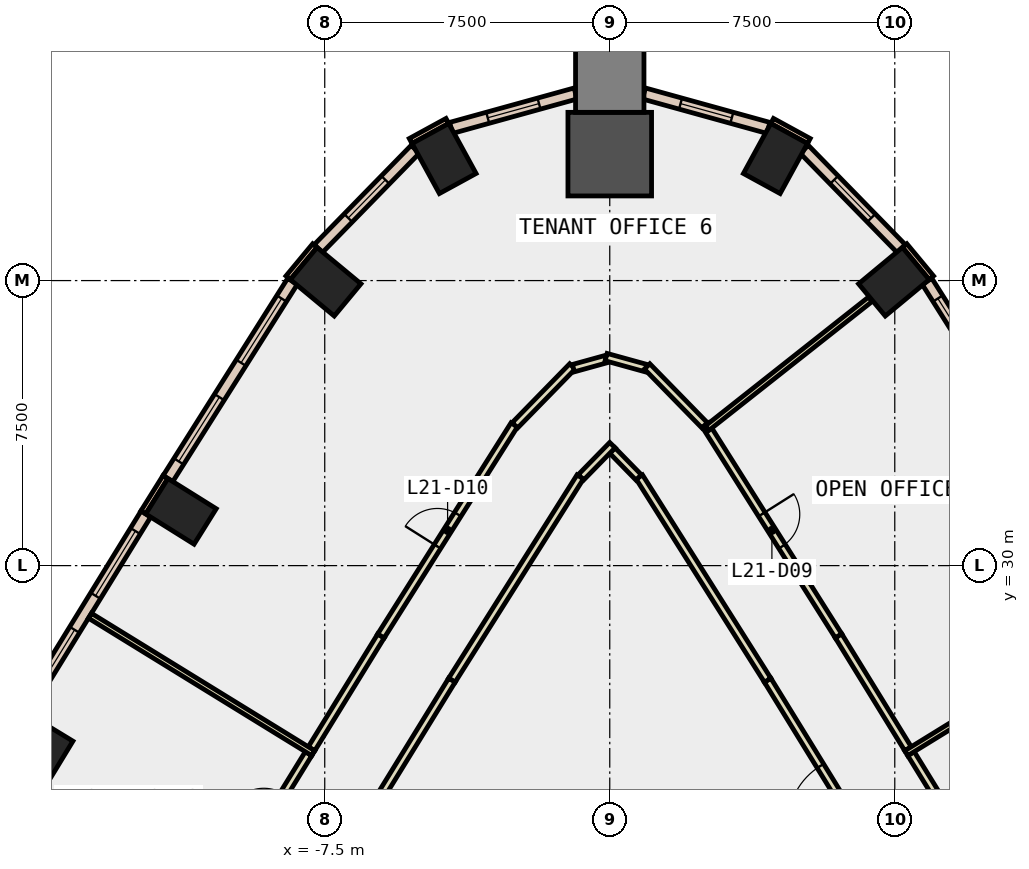
"""IFC4 building model, lengths in metres.
Left out: names, types, materials, properties, quantities, classifications, styles, units other than length and angle.
Written with IfcOpenShell. Run it as: python <this file> out.ifc"""

import sys

from ifc_helpers import new_model, si_unit, direction, frame, frame_2d, origin, origin_2d, place, context, subcontext, project, spatial, rectangle, extrude, element, fill, save


model = new_model("IFC4")
c1 = context("Model", 3, precision=1e-05, world=origin(), true_north=direction((0.0, 1.0)))
c2 = subcontext(c1, "Body", "Model", "MODEL_VIEW")
j1 = project(units=[si_unit("LENGTHUNIT", "METRE"), si_unit("PLANEANGLEUNIT", "RADIAN")], contexts=[c1])
p1 = place(None, origin())
s1 = spatial("IfcSite", under=j1, at=p1, CompositionType="ELEMENT")
p2 = place(p1, origin())
s2 = spatial("IfcBuilding", under=s1, at=p2, CompositionType="ELEMENT")
p3 = place(p2, frame((0.0, 0.0, 99.2)))
s3 = spatial("IfcBuildingStorey", under=s2, at=p3, CompositionType="ELEMENT", Elevation=99.2)
for number, where, z_axis, x_axis in (
    (1, (7.476, 37.47, -0.4), (0.0, 0.0, 1.0), (-0.638, 0.77, 0.0)),
    (2, (4.36, 40.712, -0.4), (0.0, 0.0, 1.0), (-0.877, 0.48, 0.0)),
):
    element("IfcColumn", number, at=place(p3, frame(where, z_axis=z_axis, x_axis=x_axis)), inside=s3, PredefinedType="COLUMN", context=c2, shape_type="SweptSolid", body=[
        extrude(rectangle(XDim=1.1, YDim=1.5, at=origin_2d()), origin(), (0.0, 0.0, 1.0), 4.2),
    ])
p4 = place(p3, frame((0.0, 40.827, -0.4), z_axis=(0.0, 0.0, 1.0), x_axis=(0.0, 1.0, 0.0)))
e3 = element("IfcColumn", 3, at=p4, inside=s3, PredefinedType="COLUMN", context=c2, shape_type="SweptSolid", body=[
    extrude(rectangle(XDim=2.2, YDim=2.2, at=origin_2d()), origin(), (0.0, 0.0, 1.0), 4.2),
])
for number, where, z_axis, x_axis in (
    (4, (-4.36, 40.712, -0.4), (0.0, 0.0, 1.0), (0.877, 0.48, 0.0)),
    (5, (-7.476, 37.47, -0.4), (0.0, 0.0, 1.0), (0.638, 0.77, 0.0)),
    (6, (-11.283, 31.428, -0.4), (0.0, 0.0, 1.0), (0.53, 0.848, 0.0)),
    (7, (-15.053, 25.302, -0.4), (0.0, 0.0, 1.0), (0.52, 0.854, 0.0)),
):
    element("IfcColumn", number, at=place(p3, frame(where, z_axis=z_axis, x_axis=x_axis)), inside=s3, PredefinedType="COLUMN", context=c2, shape_type="SweptSolid", body=[
        extrude(rectangle(XDim=1.1, YDim=1.5, at=origin_2d()), origin(), (0.0, 0.0, 1.0), 4.2),
    ])
p5 = place(p3, frame((0.0, 42.827, -0.4), z_axis=(0.0, 0.0, 1.0), x_axis=(0.0, 1.0, 0.0)))
e8 = element("IfcColumn", 8, at=p5, inside=s3, PredefinedType="COLUMN", context=c2, shape_type="SweptSolid", body=[
    extrude(rectangle(XDim=1.8, YDim=1.8, at=origin_2d()), origin(), (0.0, 0.0, 1.0), 4.2),
])
for number, where, z_axis, x_axis in (
    (9, (5.239, 41.172, 0.0), (0.0, 0.0, 1.0), (-0.878, 0.479, 0.0)),
    (10, (-4.273, 41.7, 0.0), (0.0, 0.0, 1.0), (-0.878, -0.479, 0.0)),
):
    element("IfcWall", number, at=place(p3, frame(where, z_axis=z_axis, x_axis=x_axis)), inside=s3, PredefinedType="STANDARD", context=c2, shape_type="SweptSolid", body=[
        extrude(rectangle(XDim=1.101, YDim=0.15, at=frame_2d((0.55, 0.0))), origin(), (0.0, 0.0, 1.0), 3.8),
    ])
for number, where, z_axis, x_axis in (
    (11, (8.462, 37.574, 0.0), (0.0, 0.0, 1.0), (-0.639, 0.77, 0.0)),
    (12, (-7.76, 38.42, 0.0), (0.0, 0.0, 1.0), (-0.639, -0.77, 0.0)),
):
    element("IfcWall", number, at=place(p3, frame(where, z_axis=z_axis, x_axis=x_axis)), inside=s3, PredefinedType="STANDARD", context=c2, shape_type="SweptSolid", body=[
        extrude(rectangle(XDim=1.099, YDim=0.15, at=frame_2d((0.55, 0.0))), origin(), (0.0, 0.0, 1.0), 3.8),
    ])
p6 = place(p3, frame((-11.691, 32.332, 0.0), z_axis=(0.0, 0.0, 1.0), x_axis=(-0.529879262372, -0.848073090782, 0.0)))
e13 = element("IfcWall", 13, at=p6, inside=s3, PredefinedType="STANDARD", context=c2, shape_type="SweptSolid", body=[
    extrude(rectangle(XDim=1.1, YDim=0.15, at=frame_2d((0.55, 0.0))), origin(), (0.0, 0.0, 1.0), 3.8),
])
p7 = place(p3, frame((11.626, 32.29, 0.0), z_axis=(0.0, 0.0, 1.0), x_axis=(-0.534018429465, 0.845472836342, 0.0)))
e14 = element("IfcWall", 14, at=p7, inside=s3, PredefinedType="STANDARD", context=c2, shape_type="SweptSolid", body=[
    extrude(rectangle(XDim=6.138, YDim=0.3, at=frame_2d((3.069, 0.0))), origin(), (0.0, 0.0, 1.0), 3.8),
])
p8 = place(p7, frame((0.535, 0.0, 0.9)))
e15 = element("IfcOpeningElement", 15, at=p8, cuts=e14, PredefinedType="OPENING", context=c2, shape_type="SweptSolid", body=[
    extrude(rectangle(XDim=2.0, YDim=2.6, at=frame_2d((1.0, 1.3))), frame((0.0, 0.16, 0.0), z_axis=(0.0, -1.0, 0.0), x_axis=(1.0, 0.0, 0.0)), (0.0, 0.0, 1.0), 0.32),
])
p9 = place(p7, frame((3.604, 0.0, 0.9)))
e16 = element("IfcOpeningElement", 16, at=p9, cuts=e14, PredefinedType="OPENING", context=c2, shape_type="SweptSolid", body=[
    extrude(rectangle(XDim=2.0, YDim=2.6, at=frame_2d((1.0, 1.3))), frame((0.0, 0.16, 0.0), z_axis=(0.0, -1.0, 0.0), x_axis=(1.0, 0.0, 0.0)), (0.0, 0.0, 1.0), 0.32),
])
p10 = place(p3, frame((7.668, 38.343, 0.0), z_axis=(0.0, 0.0, 1.0), x_axis=(-0.698695735804, 0.715418946331, 0.0)))
e17 = element("IfcWall", 17, at=p10, inside=s3, PredefinedType="STANDARD", context=c2, shape_type="SweptSolid", body=[
    extrude(rectangle(XDim=3.65, YDim=0.3, at=frame_2d((1.825, 0.0))), origin(), (0.0, 0.0, 1.0), 3.8),
])
p11 = place(p10, frame((1.125, 0.0, 0.9)))
e18 = element("IfcOpeningElement", 18, at=p11, cuts=e17, PredefinedType="OPENING", context=c2, shape_type="SweptSolid", body=[
    extrude(rectangle(XDim=1.4, YDim=2.6, at=frame_2d((0.7, 1.3))), frame((0.0, 0.16, 0.0), z_axis=(0.0, -1.0, 0.0), x_axis=(1.0, 0.0, 0.0)), (0.0, 0.0, 1.0), 0.32),
])
p12 = place(p3, frame((4.175, 41.517, 0.0), z_axis=(0.0, 0.0, 1.0), x_axis=(-0.963822898894, 0.266543466562, 0.0)))
e19 = element("IfcWall", 19, at=p12, inside=s3, PredefinedType="STANDARD", context=c2, shape_type="SweptSolid", body=[
    extrude(rectangle(XDim=3.399, YDim=0.3, at=frame_2d((1.7, 0.0))), origin(), (0.0, 0.0, 1.0), 3.8),
])
p13 = place(p12, frame((0.999, 0.0, 0.9)))
e20 = element("IfcOpeningElement", 20, at=p13, cuts=e19, PredefinedType="OPENING", context=c2, shape_type="SweptSolid", body=[
    extrude(rectangle(XDim=1.4, YDim=2.6, at=frame_2d((0.7, 1.3))), frame((0.0, 0.16, 0.0), z_axis=(0.0, -1.0, 0.0), x_axis=(1.0, 0.0, 0.0)), (0.0, 0.0, 1.0), 0.32),
])
p14 = place(p3, frame((-0.899, 42.423, 0.0), z_axis=(0.0, 0.0, 1.0), x_axis=(-0.963822898894, -0.266543466562, 0.0)))
e21 = element("IfcWall", 21, at=p14, inside=s3, PredefinedType="STANDARD", context=c2, shape_type="SweptSolid", body=[
    extrude(rectangle(XDim=3.399, YDim=0.3, at=frame_2d((1.7, 0.0))), origin(), (0.0, 0.0, 1.0), 3.8),
])
p15 = place(p14, frame((0.999, 0.0, 0.9)))
e22 = element("IfcOpeningElement", 22, at=p15, cuts=e21, PredefinedType="OPENING", context=c2, shape_type="SweptSolid", body=[
    extrude(rectangle(XDim=1.4, YDim=2.6, at=frame_2d((0.7, 1.3))), frame((0.0, 0.16, 0.0), z_axis=(0.0, -1.0, 0.0), x_axis=(1.0, 0.0, 0.0)), (0.0, 0.0, 1.0), 0.32),
])
p16 = place(p3, frame((-5.118, 40.954, 0.0), z_axis=(0.0, 0.0, 1.0), x_axis=(-0.698695735804, -0.715418946331, 0.0)))
e23 = element("IfcWall", 23, at=p16, inside=s3, PredefinedType="STANDARD", context=c2, shape_type="SweptSolid", body=[
    extrude(rectangle(XDim=3.65, YDim=0.3, at=frame_2d((1.825, 0.0))), origin(), (0.0, 0.0, 1.0), 3.8),
])
p17 = place(p16, frame((1.125, 0.0, 0.9)))
e24 = element("IfcOpeningElement", 24, at=p17, cuts=e23, PredefinedType="OPENING", context=c2, shape_type="SweptSolid", body=[
    extrude(rectangle(XDim=1.4, YDim=2.6, at=frame_2d((0.7, 1.3))), frame((0.0, 0.16, 0.0), z_axis=(0.0, -1.0, 0.0), x_axis=(1.0, 0.0, 0.0)), (0.0, 0.0, 1.0), 0.32),
])
p18 = place(p3, frame((-8.348, 37.48, 0.0), z_axis=(0.0, 0.0, 1.0), x_axis=(-0.534018429465, -0.845472836342, 0.0)))
e25 = element("IfcWall", 25, at=p18, inside=s3, PredefinedType="STANDARD", context=c2, shape_type="SweptSolid", body=[
    extrude(rectangle(XDim=6.138, YDim=0.3, at=frame_2d((3.069, 0.0))), origin(), (0.0, 0.0, 1.0), 3.8),
])
p19 = place(p18, frame((0.535, 0.0, 0.9)))
e26 = element("IfcOpeningElement", 26, at=p19, cuts=e25, PredefinedType="OPENING", context=c2, shape_type="SweptSolid", body=[
    extrude(rectangle(XDim=2.0, YDim=2.6, at=frame_2d((1.0, 1.3))), frame((0.0, 0.16, 0.0), z_axis=(0.0, -1.0, 0.0), x_axis=(1.0, 0.0, 0.0)), (0.0, 0.0, 1.0), 0.32),
])
p20 = place(p18, frame((3.604, 0.0, 0.9)))
e27 = element("IfcOpeningElement", 27, at=p20, cuts=e25, PredefinedType="OPENING", context=c2, shape_type="SweptSolid", body=[
    extrude(rectangle(XDim=2.0, YDim=2.6, at=frame_2d((1.0, 1.3))), frame((0.0, 0.16, 0.0), z_axis=(0.0, -1.0, 0.0), x_axis=(1.0, 0.0, 0.0)), (0.0, 0.0, 1.0), 0.32),
])
p21 = place(p3, frame((-12.207, 31.358, 0.0), z_axis=(0.0, 0.0, 1.0), x_axis=(-0.524121974895, -0.851643208998, 0.0)))
e28 = element("IfcWall", 28, at=p21, inside=s3, PredefinedType="STANDARD", context=c2, shape_type="SweptSolid", body=[
    extrude(rectangle(XDim=6.104, YDim=0.3, at=frame_2d((3.052, 0.0))), origin(), (0.0, 0.0, 1.0), 3.8),
])
p22 = place(p21, frame((0.526, 0.0, 0.9)))
e29 = element("IfcOpeningElement", 29, at=p22, cuts=e28, PredefinedType="OPENING", context=c2, shape_type="SweptSolid", body=[
    extrude(rectangle(XDim=2.0, YDim=2.6, at=frame_2d((1.0, 1.3))), frame((0.0, 0.16, 0.0), z_axis=(0.0, -1.0, 0.0), x_axis=(1.0, 0.0, 0.0)), (0.0, 0.0, 1.0), 0.32),
])
p23 = place(p21, frame((3.578, 0.0, 0.9)))
e30 = element("IfcOpeningElement", 30, at=p23, cuts=e28, PredefinedType="OPENING", context=c2, shape_type="SweptSolid", body=[
    extrude(rectangle(XDim=2.0, YDim=2.6, at=frame_2d((1.0, 1.3))), frame((0.0, 0.16, 0.0), z_axis=(0.0, -1.0, 0.0), x_axis=(1.0, 0.0, 0.0)), (0.0, 0.0, 1.0), 0.32),
])
p24 = place(p3, frame((7.875, 20.94, 0.0), z_axis=(0.0, 0.0, 1.0), x_axis=(-0.524183774504, 0.851605172921, 0.0)))
e31 = element("IfcWall", 31, at=p24, inside=s3, PredefinedType="PARTITIONING", context=c2, shape_type="SweptSolid", body=[
    extrude(rectangle(XDim=7.099, YDim=0.2, at=frame_2d((3.549, 0.0))), origin(), (0.0, 0.0, 1.0), 3.8),
])
p25 = place(p24, frame((2.649, 0.0, 0.0)))
e32 = element("IfcOpeningElement", 32, at=p25, cuts=e31, PredefinedType="OPENING", context=c2, shape_type="SweptSolid", body=[
    extrude(rectangle(XDim=1.8, YDim=2.1, at=frame_2d((0.9, 1.05))), frame((0.0, 0.11, 0.0), z_axis=(0.0, -1.0, 0.0), x_axis=(1.0, 0.0, 0.0)), (0.0, 0.0, 1.0), 0.22),
])
p26 = place(p3, frame((4.154, 26.985, 0.0), z_axis=(0.0, 0.0, 1.0), x_axis=(-0.53384777413, 0.84558060175, 0.0)))
e33 = element("IfcWall", 33, at=p26, inside=s3, PredefinedType="PARTITIONING", context=c2, shape_type="SweptSolid", body=[
    extrude(rectangle(XDim=6.326, YDim=0.2, at=frame_2d((3.163, 0.0))), origin(), (0.0, 0.0, 1.0), 3.8),
])
p27 = place(p3, frame((0.76, 32.321, 0.0), z_axis=(0.0, 0.0, 1.0), x_axis=(-0.698898447714, 0.715220916769, 0.0)))
e34 = element("IfcWall", 34, at=p27, inside=s3, PredefinedType="PARTITIONING", context=c2, shape_type="SweptSolid", body=[
    extrude(rectangle(XDim=0.987, YDim=0.2, at=frame_2d((0.494, 0.0))), origin(), (0.0, 0.0, 1.0), 3.8),
])
p28 = place(p3, frame((0.07, 33.17, 0.0), z_axis=(0.0, 0.0, 1.0), x_axis=(-0.699145664909, -0.714979257908, 0.0)))
e35 = element("IfcWall", 35, at=p28, inside=s3, PredefinedType="PARTITIONING", context=c2, shape_type="SweptSolid", body=[
    extrude(rectangle(XDim=1.187, YDim=0.2, at=frame_2d((0.594, 0.0))), origin(), (0.0, 0.0, 1.0), 3.8),
])
p29 = place(p3, frame((-0.777, 32.334, 0.0), z_axis=(0.0, 0.0, 1.0), x_axis=(-0.53384777413, -0.84558060175, 0.0)))
e36 = element("IfcWall", 36, at=p29, inside=s3, PredefinedType="PARTITIONING", context=c2, shape_type="SweptSolid", body=[
    extrude(rectangle(XDim=6.326, YDim=0.2, at=frame_2d((3.163, 0.0))), origin(), (0.0, 0.0, 1.0), 3.8),
])
p30 = place(p3, frame((-4.154, 26.985, 0.0), z_axis=(0.0, 0.0, 1.0), x_axis=(-0.524183774504, -0.851605172921, 0.0)))
e37 = element("IfcWall", 37, at=p30, inside=s3, PredefinedType="PARTITIONING", context=c2, shape_type="SweptSolid", body=[
    extrude(rectangle(XDim=7.099, YDim=0.2, at=frame_2d((3.549, 0.0))), origin(), (0.0, 0.0, 1.0), 3.8),
])
p31 = place(p3, frame((7.927, 25.052, 0.0), z_axis=(0.0, 0.0, 1.0), x_axis=(0.524140390501, -0.851631875311, 0.0)))
e38 = element("IfcWall", 38, at=p31, inside=s3, PredefinedType="PARTITIONING", context=c2, shape_type="SweptSolid", body=[
    extrude(rectangle(XDim=3.487, YDim=0.2, at=frame_2d((1.744, 0.0))), origin(), (0.0, 0.0, 1.0), 3.8),
])
p32 = place(p3, frame((2.513, 33.705, 0.0), z_axis=(0.0, 0.0, 1.0), x_axis=(0.533874165031, -0.845563939577, 0.0)))
e39 = element("IfcWall", 39, at=p32, inside=s3, PredefinedType="PARTITIONING", context=c2, shape_type="SweptSolid", body=[
    extrude(rectangle(XDim=6.571, YDim=0.2, at=frame_2d((3.286, 0.0))), origin(), (0.0, 0.0, 1.0), 3.8),
])
p33 = place(p32, frame((2.785, 0.0, 0.0)))
e40 = element("IfcOpeningElement", 40, at=p33, cuts=e39, PredefinedType="OPENING", context=c2, shape_type="SweptSolid", body=[
    extrude(rectangle(XDim=1.0, YDim=2.1, at=frame_2d((0.5, 1.05))), frame((0.0, 0.11, 0.0), z_axis=(0.0, -1.0, 0.0), x_axis=(1.0, 0.0, 0.0)), (0.0, 0.0, 1.0), 0.22),
])
for number, where, z_axis, x_axis in (
    (41, (6.021, 28.149, 0.0), (0.0, 0.0, 1.0), (0.524, -0.852, 0.0)),
    (42, (-7.848, 25.18, 0.0), (0.0, 0.0, 1.0), (0.524, 0.852, 0.0)),
):
    element("IfcWall", number, at=place(p3, frame(where, z_axis=z_axis, x_axis=x_axis)), inside=s3, PredefinedType="PARTITIONING", context=c2, shape_type="SweptSolid", body=[
        extrude(rectangle(XDim=3.486, YDim=0.2, at=frame_2d((1.743, 0.0))), origin(), (0.0, 0.0, 1.0), 3.8),
    ])
p34 = place(p3, frame((-6.021, 28.149, 0.0), z_axis=(0.0, 0.0, 1.0), x_axis=(0.533874165031, 0.845563939577, 0.0)))
e43 = element("IfcWall", 43, at=p34, inside=s3, PredefinedType="PARTITIONING", context=c2, shape_type="SweptSolid", body=[
    extrude(rectangle(XDim=6.571, YDim=0.2, at=frame_2d((3.286, 0.0))), origin(), (0.0, 0.0, 1.0), 3.8),
])
p35 = place(p34, frame((2.785, 0.0, 0.0)))
e44 = element("IfcOpeningElement", 44, at=p35, cuts=e43, PredefinedType="OPENING", context=c2, shape_type="SweptSolid", body=[
    extrude(rectangle(XDim=1.0, YDim=2.1, at=frame_2d((0.5, 1.05))), frame((0.0, 0.11, 0.0), z_axis=(0.0, -1.0, 0.0), x_axis=(1.0, 0.0, 0.0)), (0.0, 0.0, 1.0), 0.22),
])
p36 = place(p3, frame((-2.496, 33.692, 0.0), z_axis=(0.0, 0.0, 1.0), x_axis=(0.698771726105, 0.715344724449, 0.0)))
e45 = element("IfcWall", 45, at=p36, inside=s3, PredefinedType="PARTITIONING", context=c2, shape_type="SweptSolid", body=[
    extrude(rectangle(XDim=2.166, YDim=0.2, at=frame_2d((1.083, 0.0))), origin(), (0.0, 0.0, 1.0), 3.8),
])
p37 = place(p3, frame((-0.956, 35.196, 0.0), z_axis=(0.0, 0.0, 1.0), x_axis=(0.963772226389, 0.266726630919, 0.0)))
e46 = element("IfcWall", 46, at=p37, inside=s3, PredefinedType="PARTITIONING", context=c2, shape_type="SweptSolid", body=[
    extrude(rectangle(XDim=0.892, YDim=0.2, at=frame_2d((0.446, 0.0))), origin(), (0.0, 0.0, 1.0), 3.8),
])
p38 = place(p3, frame((-0.096, 35.487, 0.0), z_axis=(0.0, 0.0, 1.0), x_axis=(0.963802560401, -0.266616999767, 0.0)))
e47 = element("IfcWall", 47, at=p38, inside=s3, PredefinedType="PARTITIONING", context=c2, shape_type="SweptSolid", body=[
    extrude(rectangle(XDim=1.092, YDim=0.2, at=frame_2d((0.546, 0.0))), origin(), (0.0, 0.0, 1.0), 3.8),
])
p39 = place(p3, frame((0.983, 35.241, 0.0), z_axis=(0.0, 0.0, 1.0), x_axis=(0.698771726105, -0.715344724449, 0.0)))
e48 = element("IfcWall", 48, at=p39, inside=s3, PredefinedType="PARTITIONING", context=c2, shape_type="SweptSolid", body=[
    extrude(rectangle(XDim=2.166, YDim=0.2, at=frame_2d((1.083, 0.0))), origin(), (0.0, 0.0, 1.0), 3.8),
])
p40 = place(p3, frame((-9.755, 22.082, 0.0), z_axis=(0.0, 0.0, 1.0), x_axis=(0.524140390501, 0.851631875311, 0.0)))
e49 = element("IfcWall", 49, at=p40, inside=s3, PredefinedType="PARTITIONING", context=c2, shape_type="SweptSolid", body=[
    extrude(rectangle(XDim=3.487, YDim=0.2, at=frame_2d((1.744, 0.0))), origin(), (0.0, 0.0, 1.0), 3.8),
])
p41 = place(p40, frame((1.244, 0.0, 0.0)))
e50 = element("IfcOpeningElement", 50, at=p41, cuts=e49, PredefinedType="OPENING", context=c2, shape_type="SweptSolid", body=[
    extrude(rectangle(XDim=1.0, YDim=2.1, at=frame_2d((0.5, 1.05))), frame((0.0, 0.11, 0.0), z_axis=(0.0, -1.0, 0.0), x_axis=(1.0, 0.0, 0.0)), (0.0, 0.0, 1.0), 0.22),
])
p42 = place(p3, frame((7.802, 25.064, 0.0), z_axis=(0.0, 0.0, 1.0), x_axis=(0.851596352662, 0.524198103901, 0.0)))
e51 = element("IfcWall", 51, at=p42, inside=s3, PredefinedType="PARTITIONING", context=c2, shape_type="SweptSolid", body=[
    extrude(rectangle(XDim=6.9, YDim=0.15, at=frame_2d((3.45, 0.0))), origin(), (0.0, 0.0, 1.0), 3.8),
])
p43 = place(p3, frame((2.566, 33.62, 0.0), z_axis=(0.0, 0.0, 1.0), x_axis=(0.784838195876, 0.619700739304, 0.0)))
e52 = element("IfcWall", 52, at=p43, inside=s3, PredefinedType="PARTITIONING", context=c2, shape_type="SweptSolid", body=[
    extrude(rectangle(XDim=5.469, YDim=0.15, at=frame_2d((2.734, 0.0))), origin(), (0.0, 0.0, 1.0), 3.8),
])
p44 = place(p3, frame((-7.802, 25.064, 0.0), z_axis=(0.0, 0.0, 1.0), x_axis=(-0.851596352662, 0.524198103901, 0.0)))
e53 = element("IfcWall", 53, at=p44, inside=s3, PredefinedType="PARTITIONING", context=c2, shape_type="SweptSolid", body=[
    extrude(rectangle(XDim=6.9, YDim=0.15, at=frame_2d((3.45, 0.0))), origin(), (0.0, 0.0, 1.0), 3.8),
])
p45 = place(p9, origin())
e54 = element("IfcWindow", 54, at=p45, inside=s3, PartitioningType="SINGLE_PANEL", PredefinedType="WINDOW", context=c2, shape_type="SweptSolid", body=[
    extrude(rectangle(XDim=2.0, YDim=2.6, at=frame_2d((1.0, 1.3))), frame((0.0, 0.03, 0.0), z_axis=(0.0, -1.0, 0.0), x_axis=(1.0, 0.0, 0.0)), (0.0, 0.0, 1.0), 0.06),
])
fill(e16, e54)
p46 = place(p11, origin())
e55 = element("IfcWindow", 55, at=p46, inside=s3, PartitioningType="SINGLE_PANEL", PredefinedType="WINDOW", context=c2, shape_type="SweptSolid", body=[
    extrude(rectangle(XDim=1.4, YDim=2.6, at=frame_2d((0.7, 1.3))), frame((0.0, 0.03, 0.0), z_axis=(0.0, -1.0, 0.0), x_axis=(1.0, 0.0, 0.0)), (0.0, 0.0, 1.0), 0.06),
])
fill(e18, e55)
p47 = place(p13, origin())
e56 = element("IfcWindow", 56, at=p47, inside=s3, PartitioningType="SINGLE_PANEL", PredefinedType="WINDOW", context=c2, shape_type="SweptSolid", body=[
    extrude(rectangle(XDim=1.4, YDim=2.6, at=frame_2d((0.7, 1.3))), frame((0.0, 0.03, 0.0), z_axis=(0.0, -1.0, 0.0), x_axis=(1.0, 0.0, 0.0)), (0.0, 0.0, 1.0), 0.06),
])
fill(e20, e56)
p48 = place(p15, origin())
e57 = element("IfcWindow", 57, at=p48, inside=s3, PartitioningType="SINGLE_PANEL", PredefinedType="WINDOW", context=c2, shape_type="SweptSolid", body=[
    extrude(rectangle(XDim=1.4, YDim=2.6, at=frame_2d((0.7, 1.3))), frame((0.0, 0.03, 0.0), z_axis=(0.0, -1.0, 0.0), x_axis=(1.0, 0.0, 0.0)), (0.0, 0.0, 1.0), 0.06),
])
fill(e22, e57)
p49 = place(p17, origin())
e58 = element("IfcWindow", 58, at=p49, inside=s3, PartitioningType="SINGLE_PANEL", PredefinedType="WINDOW", context=c2, shape_type="SweptSolid", body=[
    extrude(rectangle(XDim=1.4, YDim=2.6, at=frame_2d((0.7, 1.3))), frame((0.0, 0.03, 0.0), z_axis=(0.0, -1.0, 0.0), x_axis=(1.0, 0.0, 0.0)), (0.0, 0.0, 1.0), 0.06),
])
fill(e24, e58)
p50 = place(p19, origin())
e59 = element("IfcWindow", 59, at=p50, inside=s3, PartitioningType="SINGLE_PANEL", PredefinedType="WINDOW", context=c2, shape_type="SweptSolid", body=[
    extrude(rectangle(XDim=2.0, YDim=2.6, at=frame_2d((1.0, 1.3))), frame((0.0, 0.03, 0.0), z_axis=(0.0, -1.0, 0.0), x_axis=(1.0, 0.0, 0.0)), (0.0, 0.0, 1.0), 0.06),
])
fill(e26, e59)
p51 = place(p20, origin())
e60 = element("IfcWindow", 60, at=p51, inside=s3, PartitioningType="SINGLE_PANEL", PredefinedType="WINDOW", context=c2, shape_type="SweptSolid", body=[
    extrude(rectangle(XDim=2.0, YDim=2.6, at=frame_2d((1.0, 1.3))), frame((0.0, 0.03, 0.0), z_axis=(0.0, -1.0, 0.0), x_axis=(1.0, 0.0, 0.0)), (0.0, 0.0, 1.0), 0.06),
])
fill(e27, e60)
p52 = place(p22, origin())
e61 = element("IfcWindow", 61, at=p52, inside=s3, PartitioningType="SINGLE_PANEL", PredefinedType="WINDOW", context=c2, shape_type="SweptSolid", body=[
    extrude(rectangle(XDim=2.0, YDim=2.6, at=frame_2d((1.0, 1.3))), frame((0.0, 0.03, 0.0), z_axis=(0.0, -1.0, 0.0), x_axis=(1.0, 0.0, 0.0)), (0.0, 0.0, 1.0), 0.06),
])
fill(e29, e61)
p53 = place(p23, origin())
e62 = element("IfcWindow", 62, at=p53, inside=s3, PartitioningType="SINGLE_PANEL", PredefinedType="WINDOW", context=c2, shape_type="SweptSolid", body=[
    extrude(rectangle(XDim=2.0, YDim=2.6, at=frame_2d((1.0, 1.3))), frame((0.0, 0.03, 0.0), z_axis=(0.0, -1.0, 0.0), x_axis=(1.0, 0.0, 0.0)), (0.0, 0.0, 1.0), 0.06),
])
fill(e30, e62)
p54 = place(p33, origin())
e63 = element("IfcDoor", 63, at=p54, inside=s3, OperationType="SINGLE_SWING_LEFT", PredefinedType="DOOR", context=c2, shape_type="SweptSolid", body=[
    extrude(rectangle(XDim=1.0, YDim=2.1, at=frame_2d((0.5, 1.05))), frame((0.0, 0.025, 0.0), z_axis=(0.0, -1.0, 0.0), x_axis=(1.0, 0.0, 0.0)), (0.0, 0.0, 1.0), 0.05),
])
fill(e40, e63)
p55 = place(p35, origin())
e64 = element("IfcDoor", 64, at=p55, inside=s3, OperationType="SINGLE_SWING_LEFT", PredefinedType="DOOR", context=c2, shape_type="SweptSolid", body=[
    extrude(rectangle(XDim=1.0, YDim=2.1, at=frame_2d((0.5, 1.05))), frame((0.0, 0.025, 0.0), z_axis=(0.0, -1.0, 0.0), x_axis=(1.0, 0.0, 0.0)), (0.0, 0.0, 1.0), 0.05),
])
fill(e44, e64)
p56 = place(p25, origin())
e65 = element("IfcDoor", 65, at=p56, inside=s3, OperationType="DOUBLE_DOOR_SINGLE_SWING", PredefinedType="DOOR", context=c2, shape_type="SweptSolid", body=[
    extrude(rectangle(XDim=1.8, YDim=2.1, at=frame_2d((0.9, 1.05))), frame((0.0, 0.025, 0.0), z_axis=(0.0, -1.0, 0.0), x_axis=(1.0, 0.0, 0.0)), (0.0, 0.0, 1.0), 0.05),
])
fill(e32, e65)
save(model, sys.argv[1])
